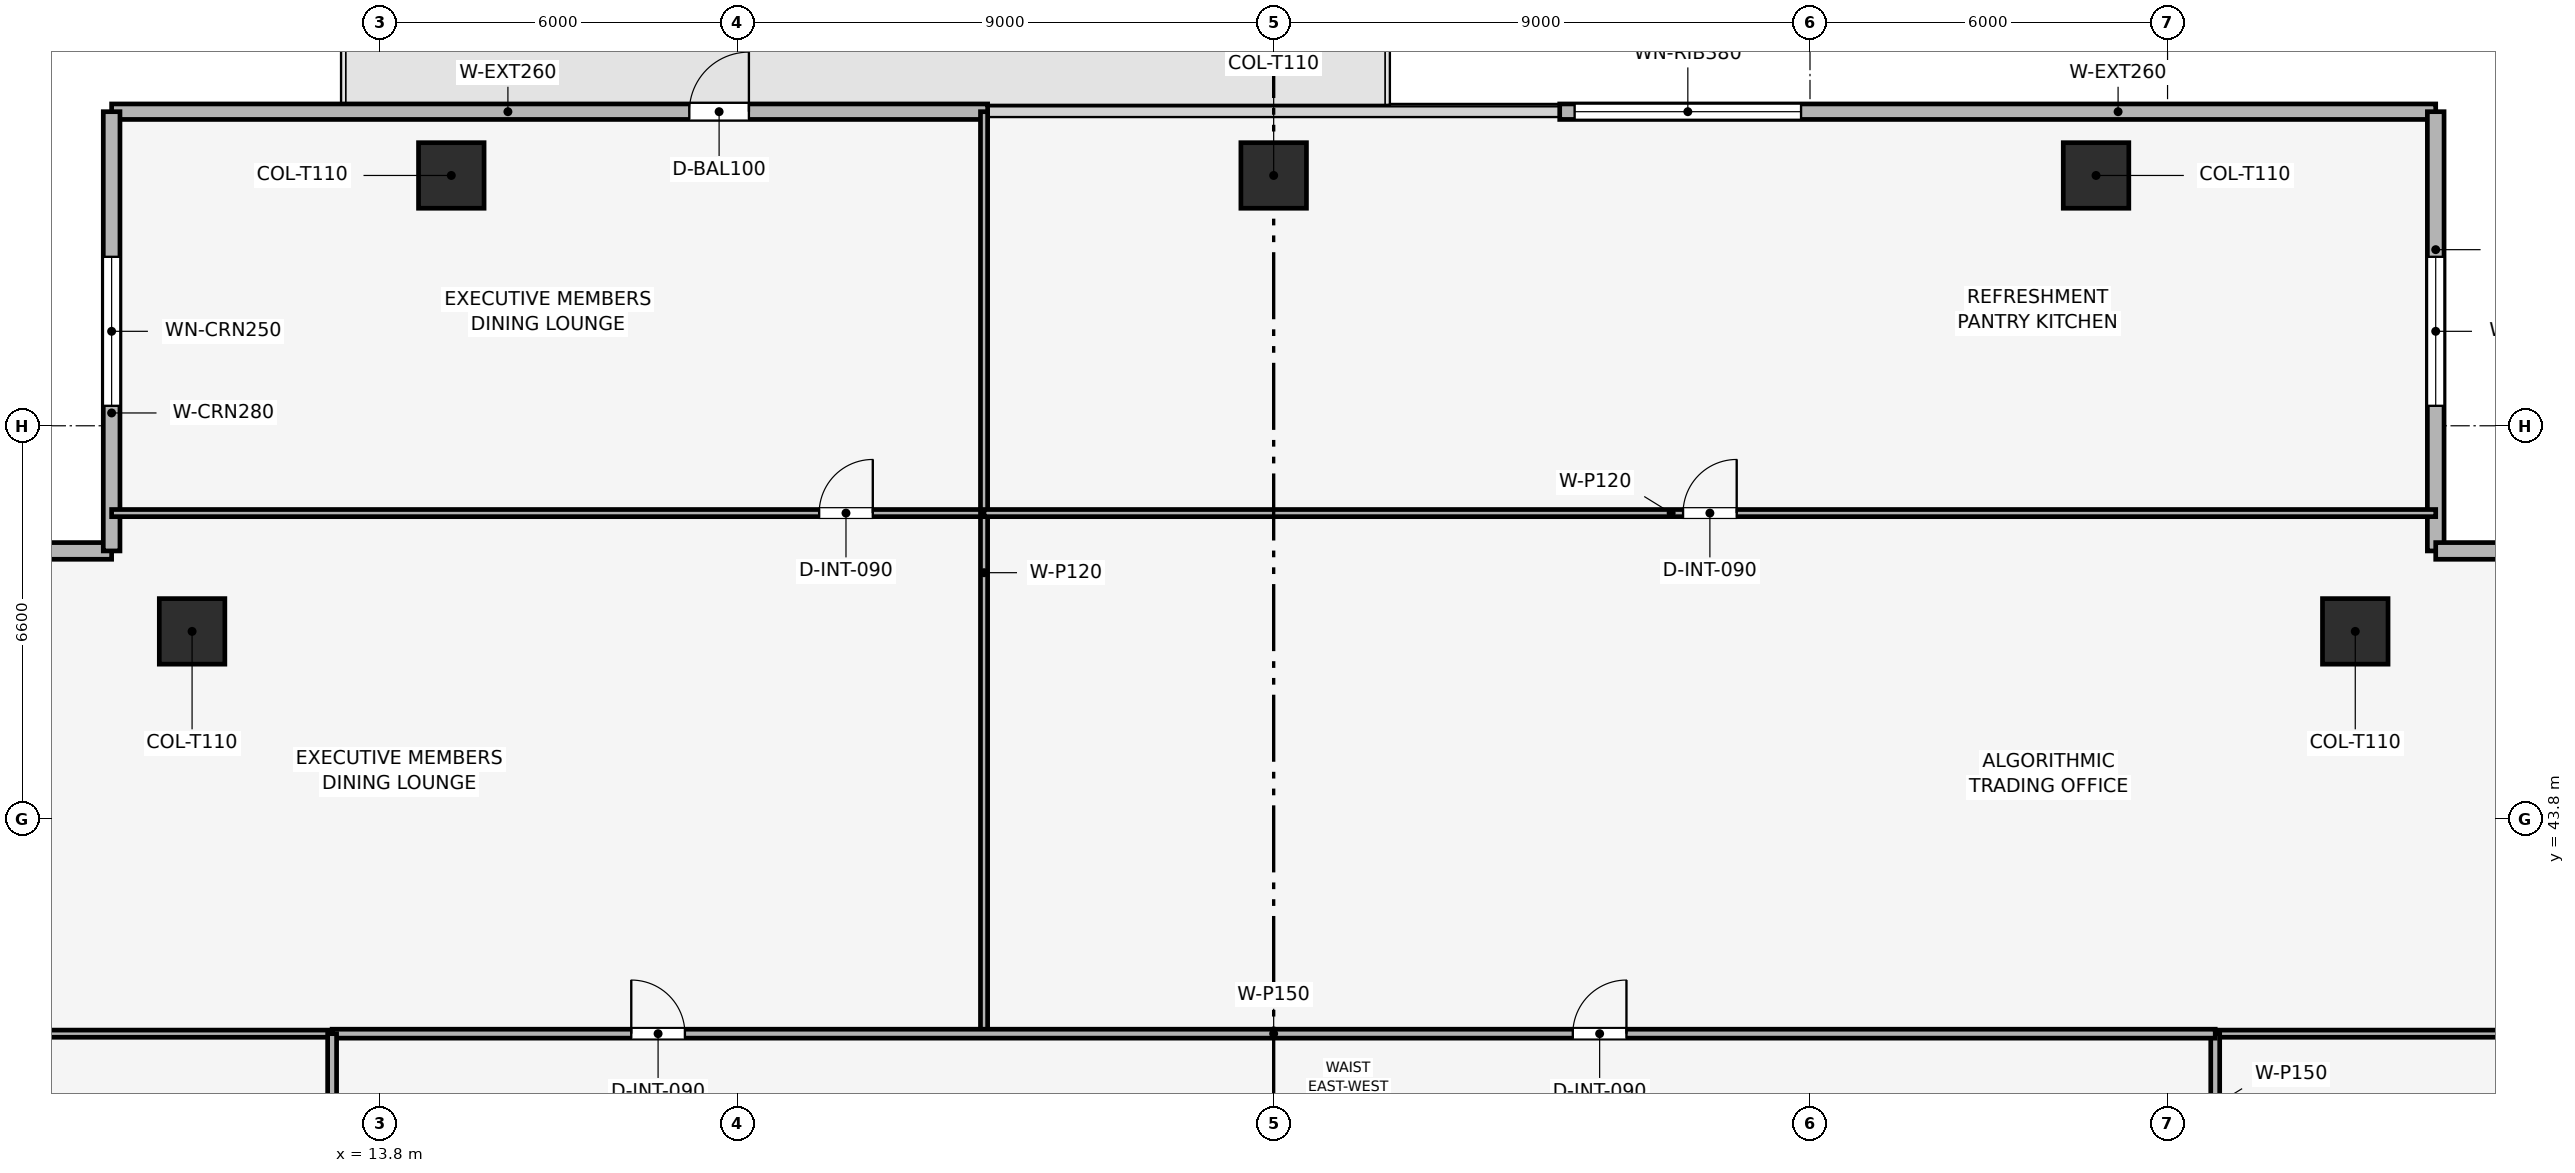
"""IFC4 building model, lengths in metres.
Left out: names, types, materials, properties, quantities, classifications, styles, units other than length and angle.
Written with IfcOpenShell. Run it as: python <this file> out.ifc"""

import sys

from ifc_helpers import new_model, si_unit, direction, frame, frame_2d, origin, origin_2d, place, context, subcontext, project, spatial, rectangle, extrude, element, fill, save


model = new_model("IFC4")
c1 = context("Model", 3, precision=1e-05, world=origin(), true_north=direction((0.0, 1.0)))
c2 = subcontext(c1, "Body", "Model", "MODEL_VIEW")
j1 = project(units=[si_unit("LENGTHUNIT", "METRE"), si_unit("PLANEANGLEUNIT", "RADIAN")], contexts=[c1])
p1 = place(None, origin())
s1 = spatial("IfcSite", under=j1, at=p1, CompositionType="ELEMENT")
p2 = place(p1, origin())
s2 = spatial("IfcBuilding", under=s1, at=p2, CompositionType="ELEMENT")
p3 = place(p2, frame((0.0, 0.0, 222.45)))
s3 = spatial("IfcBuildingStorey", under=s2, at=p3, CompositionType="ELEMENT", Elevation=222.45)
for number, where, z_axis, x_axis in (
    (1, (42.6, 54.6, 0.003), (0.0, 0.0, 1.0), (1.0, 0.0, 0.0)),
    (2, (28.8, 54.6, 0.003), (0.0, 0.0, 1.0), (1.0, 0.0, 0.0)),
    (3, (15.0, 54.6, 0.003), (0.0, 0.0, 1.0), (1.0, 0.0, 0.0)),
    (4, (46.95, 46.95, 0.003), (0.0, 0.0, 1.0), (1.0, 0.0, 0.0)),
    (5, (10.65, 46.95, 0.003), (0.0, 0.0, 1.0), (1.0, 0.0, 0.0)),
):
    element("IfcColumn", number, at=place(p3, frame(where, z_axis=z_axis, x_axis=x_axis)), inside=s3, PredefinedType="COLUMN", context=c2, shape_type="SweptSolid", body=[
        extrude(rectangle(XDim=1.1, YDim=1.1, at=origin_2d()), origin(), (0.0, 0.0, 1.0), 3.494),
    ])
p4 = place(p3, frame((9.3, 55.67, 0.0), z_axis=(0.0, 0.0, 1.0), x_axis=(1.0, 0.0, 0.0)))
e6 = element("IfcWall", 6, at=p4, inside=s3, PredefinedType="SOLIDWALL", context=c2, shape_type="SweptSolid", body=[
    extrude(rectangle(XDim=14.7, YDim=0.26, at=frame_2d((7.35, 0.0))), origin(), (0.0, 0.0, 1.0), 3.5),
])
p5 = place(p4, frame((9.694, 0.0, 0.0)))
e7 = element("IfcOpeningElement", 7, at=p5, cuts=e6, PredefinedType="OPENING", context=c2, shape_type="SweptSolid", body=[
    extrude(rectangle(XDim=1.0, YDim=2.2, at=frame_2d((0.5, 1.1))), frame((0.0, 0.14, 0.0), z_axis=(0.0, -1.0, 0.0), x_axis=(1.0, 0.0, 0.0)), (0.0, 0.0, 1.0), 0.28),
])
p6 = place(p3, frame((33.6, 55.67, 0.0), z_axis=(0.0, 0.0, 1.0), x_axis=(1.0, 0.0, 0.0)))
e8 = element("IfcWall", 8, at=p6, inside=s3, PredefinedType="SOLIDWALL", context=c2, shape_type="SweptSolid", body=[
    extrude(rectangle(XDim=14.7, YDim=0.26, at=frame_2d((7.35, 0.0))), origin(), (0.0, 0.0, 1.0), 3.5),
])
p7 = place(p6, frame((0.25, 0.0, 0.9)))
e9 = element("IfcOpeningElement", 9, at=p7, cuts=e8, PredefinedType="OPENING", context=c2, shape_type="SweptSolid", body=[
    extrude(rectangle(XDim=3.8, YDim=1.9, at=frame_2d((1.9, 0.95))), frame((0.0, 0.14, 0.0), z_axis=(0.0, -1.0, 0.0), x_axis=(1.0, 0.0, 0.0)), (0.0, 0.0, 1.0), 0.28),
])
p8 = place(p3, frame((1.93, 48.3, 0.0), z_axis=(0.0, 0.0, 1.0), x_axis=(1.0, 0.0, 0.0)))
e10 = element("IfcWall", 10, at=p8, inside=s3, PredefinedType="SOLIDWALL", context=c2, shape_type="SweptSolid", body=[
    extrude(rectangle(XDim=7.37, YDim=0.28, at=frame_2d((3.685, 0.0))), origin(), (0.0, 0.0, 1.0), 3.5),
])
p9 = place(p8, frame((2.435, 0.0, 0.9)))
e11 = element("IfcOpeningElement", 11, at=p9, cuts=e10, PredefinedType="OPENING", context=c2, shape_type="SweptSolid", body=[
    extrude(rectangle(XDim=2.5, YDim=1.9, at=frame_2d((1.25, 0.95))), frame((0.0, 0.15, 0.0), z_axis=(0.0, -1.0, 0.0), x_axis=(1.0, 0.0, 0.0)), (0.0, 0.0, 1.0), 0.3),
])
p10 = place(p3, frame((9.3, 48.3, 0.0), z_axis=(0.0, 0.0, 1.0), x_axis=(0.0, 1.0, 0.0)))
e12 = element("IfcWall", 12, at=p10, inside=s3, PredefinedType="SOLIDWALL", context=c2, shape_type="SweptSolid", body=[
    extrude(rectangle(XDim=7.37, YDim=0.28, at=frame_2d((3.685, 0.0))), origin(), (0.0, 0.0, 1.0), 3.5),
])
p11 = place(p10, frame((2.435, 0.0, 0.9)))
e13 = element("IfcOpeningElement", 13, at=p11, cuts=e12, PredefinedType="OPENING", context=c2, shape_type="SweptSolid", body=[
    extrude(rectangle(XDim=2.5, YDim=1.9, at=frame_2d((1.25, 0.95))), frame((0.0, 0.15, 0.0), z_axis=(0.0, -1.0, 0.0), x_axis=(1.0, 0.0, 0.0)), (0.0, 0.0, 1.0), 0.3),
])
p12 = place(p3, frame((48.3, 55.67, 0.0), z_axis=(0.0, 0.0, 1.0), x_axis=(0.0, -1.0, 0.0)))
e14 = element("IfcWall", 14, at=p12, inside=s3, PredefinedType="SOLIDWALL", context=c2, shape_type="SweptSolid", body=[
    extrude(rectangle(XDim=7.37, YDim=0.28, at=frame_2d((3.685, 0.0))), origin(), (0.0, 0.0, 1.0), 3.5),
])
p13 = place(p12, frame((2.435, 0.0, 0.9)))
e15 = element("IfcOpeningElement", 15, at=p13, cuts=e14, PredefinedType="OPENING", context=c2, shape_type="SweptSolid", body=[
    extrude(rectangle(XDim=2.5, YDim=1.9, at=frame_2d((1.25, 0.95))), frame((0.0, 0.15, 0.0), z_axis=(0.0, -1.0, 0.0), x_axis=(1.0, 0.0, 0.0)), (0.0, 0.0, 1.0), 0.3),
])
p14 = place(p3, frame((48.3, 48.3, 0.0), z_axis=(0.0, 0.0, 1.0), x_axis=(1.0, 0.0, 0.0)))
e16 = element("IfcWall", 16, at=p14, inside=s3, PredefinedType="SOLIDWALL", context=c2, shape_type="SweptSolid", body=[
    extrude(rectangle(XDim=7.37, YDim=0.28, at=frame_2d((3.685, 0.0))), origin(), (0.0, 0.0, 1.0), 3.5),
])
p15 = place(p14, frame((2.435, 0.0, 0.9)))
e17 = element("IfcOpeningElement", 17, at=p15, cuts=e16, PredefinedType="OPENING", context=c2, shape_type="SweptSolid", body=[
    extrude(rectangle(XDim=2.5, YDim=1.9, at=frame_2d((1.25, 0.95))), frame((0.0, 0.15, 0.0), z_axis=(0.0, -1.0, 0.0), x_axis=(1.0, 0.0, 0.0)), (0.0, 0.0, 1.0), 0.3),
])
p16 = place(p3, frame((9.3, 48.935, 0.0), z_axis=(0.0, 0.0, 1.0), x_axis=(1.0, 0.0, 0.0)))
e18 = element("IfcWall", 18, at=p16, inside=s3, PredefinedType="PARTITIONING", context=c2, shape_type="SweptSolid", body=[
    extrude(rectangle(XDim=14.64, YDim=0.12, at=frame_2d((7.32, 0.0))), origin(), (0.0, 0.0, 1.0), 2.885),
])
p17 = place(p16, frame((11.873, 0.0, 0.0)))
e19 = element("IfcOpeningElement", 19, at=p17, cuts=e18, PredefinedType="OPENING", context=c2, shape_type="SweptSolid", body=[
    extrude(rectangle(XDim=0.9, YDim=2.1, at=frame_2d((0.45, 1.05))), frame((0.0, 0.07, 0.0), z_axis=(0.0, -1.0, 0.0), x_axis=(1.0, 0.0, 0.0)), (0.0, 0.0, 1.0), 0.14),
])
p18 = place(p3, frame((23.94, 40.2, 0.0), z_axis=(0.0, 0.0, 1.0), x_axis=(0.0, 1.0, 0.0)))
e20 = element("IfcWall", 20, at=p18, inside=s3, PredefinedType="PARTITIONING", context=c2, shape_type="SweptSolid", body=[
    extrude(rectangle(XDim=15.47, YDim=0.12, at=frame_2d((7.735, 0.0))), origin(), (0.0, 0.0, 1.0), 2.885),
])
p19 = place(p3, frame((23.94, 48.935, 0.0), z_axis=(0.0, 0.0, 1.0), x_axis=(1.0, 0.0, 0.0)))
e21 = element("IfcWall", 21, at=p19, inside=s3, PredefinedType="PARTITIONING", context=c2, shape_type="SweptSolid", body=[
    extrude(rectangle(XDim=24.36, YDim=0.12, at=frame_2d((12.18, 0.0))), origin(), (0.0, 0.0, 1.0), 2.885),
])
p20 = place(p19, frame((11.73, 0.0, 0.0)))
e22 = element("IfcOpeningElement", 22, at=p20, cuts=e21, PredefinedType="OPENING", context=c2, shape_type="SweptSolid", body=[
    extrude(rectangle(XDim=0.9, YDim=2.1, at=frame_2d((0.45, 1.05))), frame((0.0, 0.07, 0.0), z_axis=(0.0, -1.0, 0.0), x_axis=(1.0, 0.0, 0.0)), (0.0, 0.0, 1.0), 0.14),
])
p21 = place(p3, frame((1.93, 40.2, 0.0), z_axis=(0.0, 0.0, 1.0), x_axis=(1.0, 0.0, 0.0)))
e23 = element("IfcWall", 23, at=p21, inside=s3, PredefinedType="PARTITIONING", context=c2, shape_type="SweptSolid", body=[
    extrude(rectangle(XDim=11.07, YDim=0.12, at=frame_2d((5.535, 0.0))), origin(), (0.0, 0.0, 1.0), 2.885),
])
p22 = place(p3, frame((44.6, 40.2, 0.0), z_axis=(0.0, 0.0, 1.0), x_axis=(1.0, 0.0, 0.0)))
e24 = element("IfcWall", 24, at=p22, inside=s3, PredefinedType="PARTITIONING", context=c2, shape_type="SweptSolid", body=[
    extrude(rectangle(XDim=11.07, YDim=0.12, at=frame_2d((5.535, 0.0))), origin(), (0.0, 0.0, 1.0), 2.885),
])
p23 = place(p3, frame((44.6, 37.8, 0.0), z_axis=(0.0, 0.0, 1.0), x_axis=(0.0, 1.0, 0.0)))
e25 = element("IfcWall", 25, at=p23, inside=s3, PredefinedType="PARTITIONING", context=c2, shape_type="SweptSolid", body=[
    extrude(rectangle(XDim=2.4, YDim=0.15, at=frame_2d((1.2, 0.0))), origin(), (0.0, 0.0, 1.0), 3.5),
])
p24 = place(p3, frame((13.0, 40.2, 0.0), z_axis=(0.0, 0.0, 1.0), x_axis=(1.0, 0.0, 0.0)))
e26 = element("IfcWall", 26, at=p24, inside=s3, PredefinedType="PARTITIONING", context=c2, shape_type="SweptSolid", body=[
    extrude(rectangle(XDim=31.6, YDim=0.15, at=frame_2d((15.8, 0.0))), origin(), (0.0, 0.0, 1.0), 3.035),
])
p25 = place(p24, frame((5.02, 0.0, 0.0)))
e27 = element("IfcOpeningElement", 27, at=p25, cuts=e26, PredefinedType="OPENING", context=c2, shape_type="SweptSolid", body=[
    extrude(rectangle(XDim=0.9, YDim=2.1, at=frame_2d((0.45, 1.05))), frame((0.0, 0.085, 0.0), z_axis=(0.0, -1.0, 0.0), x_axis=(1.0, 0.0, 0.0)), (0.0, 0.0, 1.0), 0.17),
])
p26 = place(p24, frame((20.82, 0.0, 0.0)))
e28 = element("IfcOpeningElement", 28, at=p26, cuts=e26, PredefinedType="OPENING", context=c2, shape_type="SweptSolid", body=[
    extrude(rectangle(XDim=0.9, YDim=2.1, at=frame_2d((0.45, 1.05))), frame((0.0, 0.085, 0.0), z_axis=(0.0, -1.0, 0.0), x_axis=(1.0, 0.0, 0.0)), (0.0, 0.0, 1.0), 0.17),
])
p27 = place(p3, frame((13.0, 17.4, 0.0), z_axis=(0.0, 0.0, 1.0), x_axis=(0.0, 1.0, 0.0)))
e29 = element("IfcWall", 29, at=p27, inside=s3, PredefinedType="PARTITIONING", context=c2, shape_type="SweptSolid", body=[
    extrude(rectangle(XDim=22.8, YDim=0.15, at=frame_2d((11.4, 0.0))), origin(), (0.0, 0.0, 1.0), 3.035),
])
p28 = place(p27, frame((3.1, 0.0, 0.0)))
e30 = element("IfcOpeningElement", 30, at=p28, cuts=e29, PredefinedType="OPENING", context=c2, shape_type="SweptSolid", body=[
    extrude(rectangle(XDim=0.9, YDim=2.1, at=frame_2d((0.45, 1.05))), frame((0.0, 0.085, 0.0), z_axis=(0.0, -1.0, 0.0), x_axis=(1.0, 0.0, 0.0)), (0.0, 0.0, 1.0), 0.17),
])
p29 = place(p27, frame((7.685, 0.0, 0.0)))
e31 = element("IfcOpeningElement", 31, at=p29, cuts=e29, PredefinedType="OPENING", context=c2, shape_type="SweptSolid", body=[
    extrude(rectangle(XDim=0.9, YDim=2.1, at=frame_2d((0.45, 1.05))), frame((0.0, 0.085, 0.0), z_axis=(0.0, -1.0, 0.0), x_axis=(1.0, 0.0, 0.0)), (0.0, 0.0, 1.0), 0.17),
])
p30 = place(p27, frame((15.535, 0.0, 0.0)))
e32 = element("IfcOpeningElement", 32, at=p30, cuts=e29, PredefinedType="OPENING", context=c2, shape_type="SweptSolid", body=[
    extrude(rectangle(XDim=0.9, YDim=2.1, at=frame_2d((0.45, 1.05))), frame((0.0, 0.085, 0.0), z_axis=(0.0, -1.0, 0.0), x_axis=(1.0, 0.0, 0.0)), (0.0, 0.0, 1.0), 0.17),
])
p31 = place(p5, origin())
e33 = element("IfcDoor", 33, at=p31, inside=s3, OperationType="SINGLE_SWING_RIGHT", PredefinedType="DOOR", context=c2, shape_type="SweptSolid", body=[
    extrude(rectangle(XDim=1.0, YDim=2.2, at=frame_2d((0.5, 1.1))), frame((0.0, 0.025, 0.0), z_axis=(0.0, -1.0, 0.0), x_axis=(1.0, 0.0, 0.0)), (0.0, 0.0, 1.0), 0.05),
])
fill(e7, e33)
p32 = place(p7, origin())
e34 = element("IfcWindow", 34, at=p32, inside=s3, PartitioningType="SINGLE_PANEL", PredefinedType="WINDOW", context=c2, shape_type="SweptSolid", body=[
    extrude(rectangle(XDim=3.8, YDim=1.9, at=frame_2d((1.9, 0.95))), frame((0.0, 0.03, 0.0), z_axis=(0.0, -1.0, 0.0), x_axis=(1.0, 0.0, 0.0)), (0.0, 0.0, 1.0), 0.06),
])
fill(e9, e34)
p33 = place(p11, origin())
e35 = element("IfcWindow", 35, at=p33, inside=s3, PartitioningType="SINGLE_PANEL", PredefinedType="WINDOW", context=c2, shape_type="SweptSolid", body=[
    extrude(rectangle(XDim=2.5, YDim=1.9, at=frame_2d((1.25, 0.95))), frame((0.0, 0.03, 0.0), z_axis=(0.0, -1.0, 0.0), x_axis=(1.0, 0.0, 0.0)), (0.0, 0.0, 1.0), 0.06),
])
fill(e13, e35)
p34 = place(p13, origin())
e36 = element("IfcWindow", 36, at=p34, inside=s3, PartitioningType="SINGLE_PANEL", PredefinedType="WINDOW", context=c2, shape_type="SweptSolid", body=[
    extrude(rectangle(XDim=2.5, YDim=1.9, at=frame_2d((1.25, 0.95))), frame((0.0, 0.03, 0.0), z_axis=(0.0, -1.0, 0.0), x_axis=(1.0, 0.0, 0.0)), (0.0, 0.0, 1.0), 0.06),
])
fill(e15, e36)
p35 = place(p17, origin())
e37 = element("IfcDoor", 37, at=p35, inside=s3, OperationType="SINGLE_SWING_RIGHT", PredefinedType="DOOR", context=c2, shape_type="SweptSolid", body=[
    extrude(rectangle(XDim=0.9, YDim=2.1, at=frame_2d((0.45, 1.05))), frame((0.0, 0.025, 0.0), z_axis=(0.0, -1.0, 0.0), x_axis=(1.0, 0.0, 0.0)), (0.0, 0.0, 1.0), 0.05),
])
fill(e19, e37)
p36 = place(p20, origin())
e38 = element("IfcDoor", 38, at=p36, inside=s3, OperationType="SINGLE_SWING_RIGHT", PredefinedType="DOOR", context=c2, shape_type="SweptSolid", body=[
    extrude(rectangle(XDim=0.9, YDim=2.1, at=frame_2d((0.45, 1.05))), frame((0.0, 0.025, 0.0), z_axis=(0.0, -1.0, 0.0), x_axis=(1.0, 0.0, 0.0)), (0.0, 0.0, 1.0), 0.05),
])
fill(e22, e38)
p37 = place(p25, origin())
e39 = element("IfcDoor", 39, at=p37, inside=s3, OperationType="SINGLE_SWING_LEFT", PredefinedType="DOOR", context=c2, shape_type="SweptSolid", body=[
    extrude(rectangle(XDim=0.9, YDim=2.1, at=frame_2d((0.45, 1.05))), frame((0.0, 0.025, 0.0), z_axis=(0.0, -1.0, 0.0), x_axis=(1.0, 0.0, 0.0)), (0.0, 0.0, 1.0), 0.05),
])
fill(e27, e39)
p38 = place(p26, origin())
e40 = element("IfcDoor", 40, at=p38, inside=s3, OperationType="SINGLE_SWING_RIGHT", PredefinedType="DOOR", context=c2, shape_type="SweptSolid", body=[
    extrude(rectangle(XDim=0.9, YDim=2.1, at=frame_2d((0.45, 1.05))), frame((0.0, 0.025, 0.0), z_axis=(0.0, -1.0, 0.0), x_axis=(1.0, 0.0, 0.0)), (0.0, 0.0, 1.0), 0.05),
])
fill(e28, e40)
save(model, sys.argv[1])
